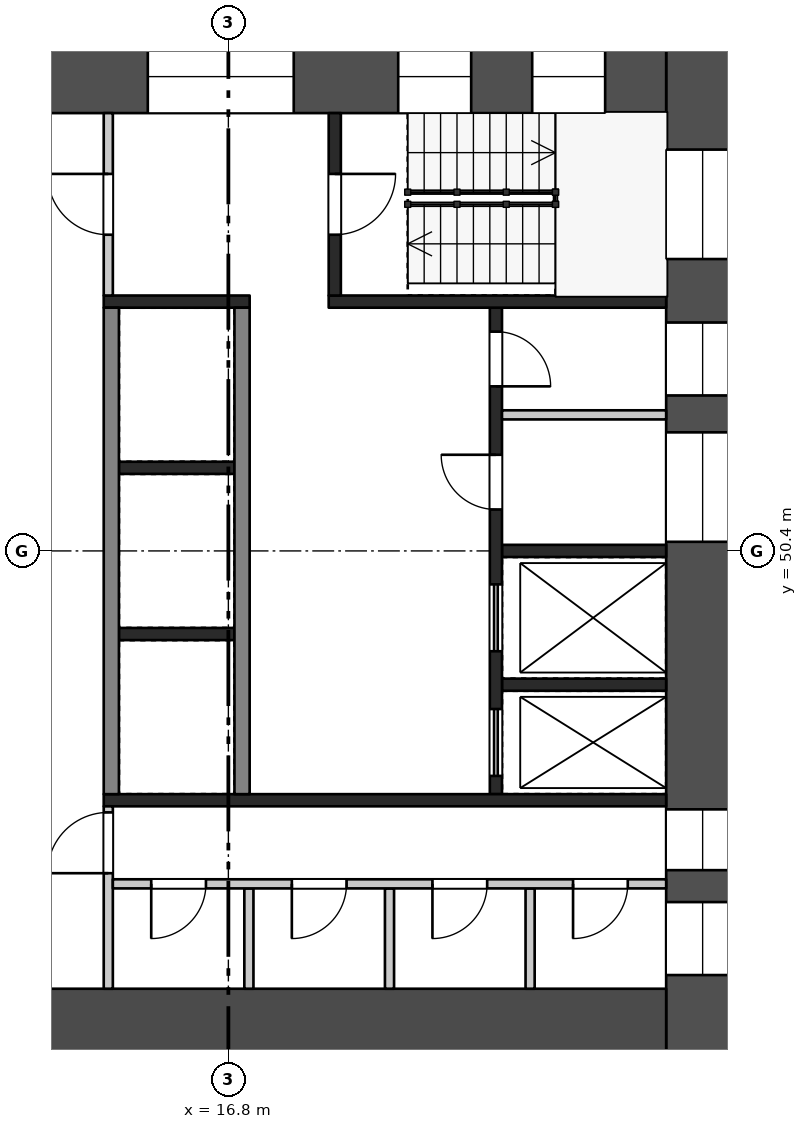
"""IFC4 building model, lengths in metres.
Left out: names, types, materials, properties, quantities, classifications, styles, units other than length and angle.
Written with IfcOpenShell. Run it as: python <this file> out.ifc"""

import sys

from ifc_helpers import new_model, si_unit, direction, frame, frame_2d, origin, place, context, subcontext, project, spatial, rectangle, extrude, element, fill, save


model = new_model("IFC4")
c1 = context("Model", 3, precision=1e-05, world=origin(), true_north=direction((0.0, 1.0)))
c2 = subcontext(c1, "Body", "Model", "MODEL_VIEW")
j1 = project(units=[si_unit("LENGTHUNIT", "METRE"), si_unit("PLANEANGLEUNIT", "RADIAN")], contexts=[c1])
p1 = place(None, origin())
s1 = spatial("IfcSite", under=j1, at=p1, CompositionType="ELEMENT")
p2 = place(p1, origin())
s2 = spatial("IfcBuilding", under=s1, at=p2, CompositionType="ELEMENT")
p3 = place(p2, frame((0.0, 0.0, 91.7)))
s3 = spatial("IfcBuildingStorey", under=s2, at=p3, CompositionType="ELEMENT", Elevation=91.7)
p4 = place(p3, frame((24.6, 58.8, 0.0), z_axis=(0.0, 0.0, 1.0), x_axis=(0.0, -1.0, 0.0)))
e1 = element("IfcWall", 1, at=p4, inside=s3, PredefinedType="SHEAR", context=c2, shape_type="SweptSolid", body=[
    extrude(rectangle(XDim=16.8, YDim=1.2, at=frame_2d((8.4, 0.0))), origin(), (0.0, 0.0, 1.0), 3.22),
])
p5 = place(p4, frame((1.8, 0.0, 0.5)))
e2 = element("IfcOpeningElement", 2, at=p5, cuts=e1, PredefinedType="OPENING", context=c2, shape_type="SweptSolid", body=[
    extrude(rectangle(XDim=1.8, YDim=2.4, at=frame_2d((0.9, 1.2))), frame((0.0, 0.61, 0.0), z_axis=(0.0, -1.0, 0.0), x_axis=(1.0, 0.0, 0.0)), (0.0, 0.0, 1.0), 1.22),
])
p6 = place(p4, frame((4.644, 0.0, 1.6)))
e3 = element("IfcOpeningElement", 3, at=p6, cuts=e1, PredefinedType="OPENING", context=c2, shape_type="SweptSolid", body=[
    extrude(rectangle(XDim=1.2, YDim=1.2, at=frame_2d((0.6, 0.6))), frame((0.0, 0.61, 0.0), z_axis=(0.0, -1.0, 0.0), x_axis=(1.0, 0.0, 0.0)), (0.0, 0.0, 1.0), 1.22),
])
p7 = place(p4, frame((6.45, 0.0, 1.6)))
e4 = element("IfcOpeningElement", 4, at=p7, cuts=e1, PredefinedType="OPENING", context=c2, shape_type="SweptSolid", body=[
    extrude(rectangle(XDim=1.8, YDim=1.2, at=frame_2d((0.9, 0.6))), frame((0.0, 0.61, 0.0), z_axis=(0.0, -1.0, 0.0), x_axis=(1.0, 0.0, 0.0)), (0.0, 0.0, 1.0), 1.22),
])
p8 = place(p4, frame((12.65, 0.0, 0.6)))
e5 = element("IfcOpeningElement", 5, at=p8, cuts=e1, PredefinedType="OPENING", context=c2, shape_type="SweptSolid", body=[
    extrude(rectangle(XDim=1.0, YDim=2.1, at=frame_2d((0.5, 1.05))), frame((0.0, 0.61, 0.0), z_axis=(0.0, -1.0, 0.0), x_axis=(1.0, 0.0, 0.0)), (0.0, 0.0, 1.0), 1.22),
])
p9 = place(p4, frame((14.175, 0.0, 1.6)))
e6 = element("IfcOpeningElement", 6, at=p9, cuts=e1, PredefinedType="OPENING", context=c2, shape_type="SweptSolid", body=[
    extrude(rectangle(XDim=1.2, YDim=1.2, at=frame_2d((0.6, 0.6))), frame((0.0, 0.61, 0.0), z_axis=(0.0, -1.0, 0.0), x_axis=(1.0, 0.0, 0.0)), (0.0, 0.0, 1.0), 1.22),
])
p10 = place(p3, frame((9.6, 58.2, 0.0), z_axis=(0.0, 0.0, 1.0), x_axis=(1.0, 0.0, 0.0)))
e7 = element("IfcWall", 7, at=p10, inside=s3, PredefinedType="SHEAR", context=c2, shape_type="SweptSolid", body=[
    extrude(rectangle(XDim=14.4, YDim=1.2, at=frame_2d((7.2, 0.0))), origin(), (0.0, 0.0, 1.0), 3.22),
])
p11 = place(p10, frame((1.105, 0.0, 0.6)))
e8 = element("IfcOpeningElement", 8, at=p11, cuts=e7, PredefinedType="OPENING", context=c2, shape_type="SweptSolid", body=[
    extrude(rectangle(XDim=3.0, YDim=2.1, at=frame_2d((1.5, 1.05))), frame((0.0, 0.61, 0.0), z_axis=(0.0, -1.0, 0.0), x_axis=(1.0, 0.0, 0.0)), (0.0, 0.0, 1.0), 1.22),
])
p12 = place(p10, frame((5.875, 0.0, 0.6)))
e9 = element("IfcOpeningElement", 9, at=p12, cuts=e7, PredefinedType="OPENING", context=c2, shape_type="SweptSolid", body=[
    extrude(rectangle(XDim=2.4, YDim=2.1, at=frame_2d((1.2, 1.05))), frame((0.0, 0.61, 0.0), z_axis=(0.0, -1.0, 0.0), x_axis=(1.0, 0.0, 0.0)), (0.0, 0.0, 1.0), 1.22),
])
p13 = place(p10, frame((9.993, 0.0, 0.5)))
e10 = element("IfcOpeningElement", 10, at=p13, cuts=e7, PredefinedType="OPENING", context=c2, shape_type="SweptSolid", body=[
    extrude(rectangle(XDim=1.2, YDim=2.4, at=frame_2d((0.6, 1.2))), frame((0.0, 0.61, 0.0), z_axis=(0.0, -1.0, 0.0), x_axis=(1.0, 0.0, 0.0)), (0.0, 0.0, 1.0), 1.22),
])
p14 = place(p10, frame((12.197, 0.0, 0.5)))
e11 = element("IfcOpeningElement", 11, at=p14, cuts=e7, PredefinedType="OPENING", context=c2, shape_type="SweptSolid", body=[
    extrude(rectangle(XDim=1.2, YDim=2.4, at=frame_2d((0.6, 1.2))), frame((0.0, 0.61, 0.0), z_axis=(0.0, -1.0, 0.0), x_axis=(1.0, 0.0, 0.0)), (0.0, 0.0, 1.0), 1.22),
])
p15 = place(p3, frame((9.6, 42.6, 0.0), z_axis=(0.0, 0.0, 1.0), x_axis=(1.0, 0.0, 0.0)))
e12 = element("IfcWall", 12, at=p15, inside=s3, PredefinedType="SHEAR", context=c2, shape_type="SweptSolid", body=[
    extrude(rectangle(XDim=14.4, YDim=1.2, at=frame_2d((7.2, 0.0))), origin(), (0.0, 0.0, 1.0), 3.22),
])
p16 = place(p15, frame((2.1, 0.0, 0.0)))
e13 = element("IfcOpeningElement", 13, at=p16, cuts=e12, PredefinedType="OPENING", context=c2, shape_type="SweptSolid", body=[
    extrude(rectangle(XDim=1.8, YDim=2.1, at=frame_2d((0.9, 1.05))), frame((0.0, 0.61, 0.0), z_axis=(0.0, -1.0, 0.0), x_axis=(1.0, 0.0, 0.0)), (0.0, 0.0, 1.0), 1.22),
])
for number, where, z_axis, x_axis in (
    (14, (15.0, 51.767, 0.0), (0.0, 0.0, 1.0), (1.0, 0.0, 0.0)),
    (15, (15.0, 49.033, 0.0), (0.0, 0.0, 1.0), (1.0, 0.0, 0.0)),
):
    element("IfcWall", number, at=place(p3, frame(where, z_axis=z_axis, x_axis=x_axis)), inside=s3, PredefinedType="SHEAR", context=c2, shape_type="SweptSolid", body=[
        extrude(rectangle(XDim=1.9, YDim=0.2, at=frame_2d((0.95, 0.0))), origin(), (0.0, 0.0, 1.0), 3.22),
    ])
for number, where, z_axis, x_axis in (
    (16, (14.875, 54.4, 0.0), (0.0, 0.0, 1.0), (0.0, -1.0, 0.0)),
    (17, (17.025, 54.4, 0.0), (0.0, 0.0, 1.0), (0.0, -1.0, 0.0)),
):
    element("IfcWall", number, at=place(p3, frame(where, z_axis=z_axis, x_axis=x_axis)), inside=s3, PredefinedType="SHEAR", context=c2, shape_type="SweptSolid", body=[
        extrude(rectangle(XDim=8.0, YDim=0.25, at=frame_2d((4.0, 0.0))), origin(), (0.0, 0.0, 1.0), 3.22),
    ])
for number, where, z_axis, x_axis in (
    (18, (21.3, 50.4, 0.0), (0.0, 0.0, 1.0), (1.0, 0.0, 0.0)),
    (19, (21.3, 48.2, 0.0), (0.0, 0.0, 1.0), (1.0, 0.0, 0.0)),
):
    element("IfcWall", number, at=place(p3, frame(where, z_axis=z_axis, x_axis=x_axis)), inside=s3, PredefinedType="SHEAR", context=c2, shape_type="SweptSolid", body=[
        extrude(rectangle(XDim=2.7, YDim=0.2, at=frame_2d((1.35, 0.0))), origin(), (0.0, 0.0, 1.0), 3.22),
    ])
p17 = place(p3, frame((21.3, 52.637, 0.0), z_axis=(0.0, 0.0, 1.0), x_axis=(1.0, 0.0, 0.0)))
e20 = element("IfcWall", 20, at=p17, inside=s3, PredefinedType="PARTITIONING", context=c2, shape_type="SweptSolid", body=[
    extrude(rectangle(XDim=2.7, YDim=0.15, at=frame_2d((1.35, 0.0))), origin(), (0.0, 0.0, 1.0), 3.22),
])
p18 = place(p3, frame((21.2, 54.4, 0.0), z_axis=(0.0, 0.0, 1.0), x_axis=(0.0, -1.0, 0.0)))
e21 = element("IfcWall", 21, at=p18, inside=s3, PredefinedType="SHEAR", context=c2, shape_type="SweptSolid", body=[
    extrude(rectangle(XDim=8.0, YDim=0.2, at=frame_2d((4.0, 0.0))), origin(), (0.0, 0.0, 1.0), 3.22),
])
p19 = place(p18, frame((0.394, 0.0, 0.0)))
e22 = element("IfcOpeningElement", 22, at=p19, cuts=e21, PredefinedType="OPENING", context=c2, shape_type="SweptSolid", body=[
    extrude(rectangle(XDim=0.9, YDim=2.1, at=frame_2d((0.45, 1.05))), frame((0.0, 0.11, 0.0), z_axis=(0.0, -1.0, 0.0), x_axis=(1.0, 0.0, 0.0)), (0.0, 0.0, 1.0), 0.22),
])
p20 = place(p18, frame((2.419, 0.0, 0.0)))
e23 = element("IfcOpeningElement", 23, at=p20, cuts=e21, PredefinedType="OPENING", context=c2, shape_type="SweptSolid", body=[
    extrude(rectangle(XDim=0.9, YDim=2.1, at=frame_2d((0.45, 1.05))), frame((0.0, 0.11, 0.0), z_axis=(0.0, -1.0, 0.0), x_axis=(1.0, 0.0, 0.0)), (0.0, 0.0, 1.0), 0.22),
])
p21 = place(p18, frame((4.55, 0.0, 0.0)))
e24 = element("IfcOpeningElement", 24, at=p21, cuts=e21, PredefinedType="OPENING", context=c2, shape_type="SweptSolid", body=[
    extrude(rectangle(XDim=1.1, YDim=2.1, at=frame_2d((0.55, 1.05))), frame((0.0, 0.11, 0.0), z_axis=(0.0, -1.0, 0.0), x_axis=(1.0, 0.0, 0.0)), (0.0, 0.0, 1.0), 0.22),
])
p22 = place(p18, frame((6.6, 0.0, 0.0)))
e25 = element("IfcOpeningElement", 25, at=p22, cuts=e21, PredefinedType="OPENING", context=c2, shape_type="SweptSolid", body=[
    extrude(rectangle(XDim=1.1, YDim=2.1, at=frame_2d((0.55, 1.05))), frame((0.0, 0.11, 0.0), z_axis=(0.0, -1.0, 0.0), x_axis=(1.0, 0.0, 0.0)), (0.0, 0.0, 1.0), 0.22),
])
p23 = place(p3, frame((14.75, 54.5, 0.0), z_axis=(0.0, 0.0, 1.0), x_axis=(1.0, 0.0, 0.0)))
e26 = element("IfcWall", 26, at=p23, inside=s3, PredefinedType="SHEAR", context=c2, shape_type="SweptSolid", body=[
    extrude(rectangle(XDim=2.4, YDim=0.2, at=frame_2d((1.2, 0.0))), origin(), (0.0, 0.0, 1.0), 3.22),
])
p24 = place(p3, frame((18.45, 54.5, 0.0), z_axis=(0.0, 0.0, 1.0), x_axis=(1.0, 0.0, 0.0)))
e27 = element("IfcWall", 27, at=p24, inside=s3, PredefinedType="SHEAR", context=c2, shape_type="SweptSolid", body=[
    extrude(rectangle(XDim=5.55, YDim=0.2, at=frame_2d((2.775, 0.0))), origin(), (0.0, 0.0, 1.0), 3.22),
])
p25 = place(p3, frame((14.825, 57.6, 0.0), z_axis=(0.0, 0.0, 1.0), x_axis=(0.0, -1.0, 0.0)))
e28 = element("IfcWall", 28, at=p25, inside=s3, PredefinedType="PARTITIONING", context=c2, shape_type="SweptSolid", body=[
    extrude(rectangle(XDim=3.0, YDim=0.15, at=frame_2d((1.5, 0.0))), origin(), (0.0, 0.0, 1.0), 3.22),
])
p26 = place(p25, frame((1.0, 0.0, 0.0)))
e29 = element("IfcOpeningElement", 29, at=p26, cuts=e28, PredefinedType="OPENING", context=c2, shape_type="SweptSolid", body=[
    extrude(rectangle(XDim=1.0, YDim=2.1, at=frame_2d((0.5, 1.05))), frame((0.0, 0.085, 0.0), z_axis=(0.0, -1.0, 0.0), x_axis=(1.0, 0.0, 0.0)), (0.0, 0.0, 1.0), 0.17),
])
p27 = place(p3, frame((18.55, 57.6, 0.0), z_axis=(0.0, 0.0, 1.0), x_axis=(0.0, -1.0, 0.0)))
e30 = element("IfcWall", 30, at=p27, inside=s3, PredefinedType="SHEAR", context=c2, shape_type="SweptSolid", body=[
    extrude(rectangle(XDim=3.0, YDim=0.2, at=frame_2d((1.5, 0.0))), origin(), (0.0, 0.0, 1.0), 3.22),
])
p28 = place(p27, frame((1.0, 0.0, 0.0)))
e31 = element("IfcOpeningElement", 31, at=p28, cuts=e30, PredefinedType="OPENING", context=c2, shape_type="SweptSolid", body=[
    extrude(rectangle(XDim=1.0, YDim=2.1, at=frame_2d((0.5, 1.05))), frame((0.0, 0.11, 0.0), z_axis=(0.0, -1.0, 0.0), x_axis=(1.0, 0.0, 0.0)), (0.0, 0.0, 1.0), 0.22),
])
p29 = place(p3, frame((14.75, 46.3, 0.0), z_axis=(0.0, 0.0, 1.0), x_axis=(1.0, 0.0, 0.0)))
e32 = element("IfcWall", 32, at=p29, inside=s3, PredefinedType="SHEAR", context=c2, shape_type="SweptSolid", body=[
    extrude(rectangle(XDim=9.25, YDim=0.2, at=frame_2d((4.625, 0.0))), origin(), (0.0, 0.0, 1.0), 3.22),
])
p30 = place(p3, frame((14.825, 46.2, 0.0), z_axis=(0.0, 0.0, 1.0), x_axis=(0.0, -1.0, 0.0)))
e33 = element("IfcWall", 33, at=p30, inside=s3, PredefinedType="PARTITIONING", context=c2, shape_type="SweptSolid", body=[
    extrude(rectangle(XDim=3.0, YDim=0.15, at=frame_2d((1.5, 0.0))), origin(), (0.0, 0.0, 1.0), 3.22),
])
p31 = place(p30, frame((0.1, 0.0, 0.0)))
e34 = element("IfcOpeningElement", 34, at=p31, cuts=e33, PredefinedType="OPENING", context=c2, shape_type="SweptSolid", body=[
    extrude(rectangle(XDim=1.0, YDim=2.1, at=frame_2d((0.5, 1.05))), frame((0.0, 0.085, 0.0), z_axis=(0.0, -1.0, 0.0), x_axis=(1.0, 0.0, 0.0)), (0.0, 0.0, 1.0), 0.17),
])
for number, where, z_axis, x_axis in (
    (35, (17.137, 44.85, 0.0), (0.0, 0.0, 1.0), (0.0, -1.0, 0.0)),
    (36, (19.45, 44.85, 0.0), (0.0, 0.0, 1.0), (0.0, -1.0, 0.0)),
    (37, (21.762, 44.85, 0.0), (0.0, 0.0, 1.0), (0.0, -1.0, 0.0)),
):
    element("IfcWall", number, at=place(p3, frame(where, z_axis=z_axis, x_axis=x_axis)), inside=s3, PredefinedType="PARTITIONING", context=c2, shape_type="SweptSolid", body=[
        extrude(rectangle(XDim=1.65, YDim=0.15, at=frame_2d((0.825, 0.0))), origin(), (0.0, 0.0, 1.0), 3.22),
    ])
p32 = place(p3, frame((14.9, 44.925, 0.0), z_axis=(0.0, 0.0, 1.0), x_axis=(1.0, 0.0, 0.0)))
e38 = element("IfcWall", 38, at=p32, inside=s3, PredefinedType="PARTITIONING", context=c2, shape_type="SweptSolid", body=[
    extrude(rectangle(XDim=9.1, YDim=0.15, at=frame_2d((4.55, 0.0))), origin(), (0.0, 0.0, 1.0), 3.22),
])
p33 = place(p32, frame((0.631, 0.0, 0.0)))
e39 = element("IfcOpeningElement", 39, at=p33, cuts=e38, PredefinedType="OPENING", context=c2, shape_type="SweptSolid", body=[
    extrude(rectangle(XDim=0.9, YDim=2.1, at=frame_2d((0.45, 1.05))), frame((0.0, 0.085, 0.0), z_axis=(0.0, -1.0, 0.0), x_axis=(1.0, 0.0, 0.0)), (0.0, 0.0, 1.0), 0.17),
])
p34 = place(p32, frame((2.944, 0.0, 0.0)))
e40 = element("IfcOpeningElement", 40, at=p34, cuts=e38, PredefinedType="OPENING", context=c2, shape_type="SweptSolid", body=[
    extrude(rectangle(XDim=0.9, YDim=2.1, at=frame_2d((0.45, 1.05))), frame((0.0, 0.085, 0.0), z_axis=(0.0, -1.0, 0.0), x_axis=(1.0, 0.0, 0.0)), (0.0, 0.0, 1.0), 0.17),
])
p35 = place(p32, frame((5.256, 0.0, 0.0)))
e41 = element("IfcOpeningElement", 41, at=p35, cuts=e38, PredefinedType="OPENING", context=c2, shape_type="SweptSolid", body=[
    extrude(rectangle(XDim=0.9, YDim=2.1, at=frame_2d((0.45, 1.05))), frame((0.0, 0.085, 0.0), z_axis=(0.0, -1.0, 0.0), x_axis=(1.0, 0.0, 0.0)), (0.0, 0.0, 1.0), 0.17),
])
p36 = place(p32, frame((7.569, 0.0, 0.0)))
e42 = element("IfcOpeningElement", 42, at=p36, cuts=e38, PredefinedType="OPENING", context=c2, shape_type="SweptSolid", body=[
    extrude(rectangle(XDim=0.9, YDim=2.1, at=frame_2d((0.45, 1.05))), frame((0.0, 0.085, 0.0), z_axis=(0.0, -1.0, 0.0), x_axis=(1.0, 0.0, 0.0)), (0.0, 0.0, 1.0), 0.17),
])
p37 = place(p19, origin())
e43 = element("IfcDoor", 43, at=p37, inside=s3, OperationType="SINGLE_SWING_RIGHT", PredefinedType="DOOR", context=c2, shape_type="SweptSolid", body=[
    extrude(rectangle(XDim=0.9, YDim=2.1, at=frame_2d((0.45, 1.05))), frame((0.0, 0.025, 0.0), z_axis=(0.0, -1.0, 0.0), x_axis=(1.0, 0.0, 0.0)), (0.0, 0.0, 1.0), 0.05),
])
fill(e22, e43)
p38 = place(p20, frame((0.9, 0.0, 0.0), z_axis=(0.0, 0.0, 1.0), x_axis=(-1.0, 0.0, 0.0)))
e44 = element("IfcDoor", 44, at=p38, inside=s3, OperationType="SINGLE_SWING_RIGHT", PredefinedType="DOOR", context=c2, shape_type="SweptSolid", body=[
    extrude(rectangle(XDim=0.9, YDim=2.1, at=frame_2d((0.45, 1.05))), frame((0.0, 0.025, 0.0), z_axis=(0.0, -1.0, 0.0), x_axis=(1.0, 0.0, 0.0)), (0.0, 0.0, 1.0), 0.05),
])
fill(e23, e44)
p39 = place(p21, origin())
e45 = element("IfcDoor", 45, at=p39, inside=s3, OperationType="DOUBLE_DOOR_SLIDING", PredefinedType="DOOR", context=c2, shape_type="SweptSolid", body=[
    extrude(rectangle(XDim=1.1, YDim=2.1, at=frame_2d((0.55, 1.05))), frame((0.0, 0.025, 0.0), z_axis=(0.0, -1.0, 0.0), x_axis=(1.0, 0.0, 0.0)), (0.0, 0.0, 1.0), 0.05),
])
fill(e24, e45)
p40 = place(p22, origin())
e46 = element("IfcDoor", 46, at=p40, inside=s3, OperationType="DOUBLE_DOOR_SLIDING", PredefinedType="DOOR", context=c2, shape_type="SweptSolid", body=[
    extrude(rectangle(XDim=1.1, YDim=2.1, at=frame_2d((0.55, 1.05))), frame((0.0, 0.025, 0.0), z_axis=(0.0, -1.0, 0.0), x_axis=(1.0, 0.0, 0.0)), (0.0, 0.0, 1.0), 0.05),
])
fill(e25, e46)
p41 = place(p26, frame((1.0, 0.0, 0.0), z_axis=(0.0, 0.0, 1.0), x_axis=(-1.0, 0.0, 0.0)))
e47 = element("IfcDoor", 47, at=p41, inside=s3, OperationType="SINGLE_SWING_RIGHT", PredefinedType="DOOR", context=c2, shape_type="SweptSolid", body=[
    extrude(rectangle(XDim=1.0, YDim=2.1, at=frame_2d((0.5, 1.05))), frame((0.0, 0.025, 0.0), z_axis=(0.0, -1.0, 0.0), x_axis=(1.0, 0.0, 0.0)), (0.0, 0.0, 1.0), 0.05),
])
fill(e29, e47)
p42 = place(p28, origin())
e48 = element("IfcDoor", 48, at=p42, inside=s3, OperationType="SINGLE_SWING_LEFT", PredefinedType="DOOR", context=c2, shape_type="SweptSolid", body=[
    extrude(rectangle(XDim=1.0, YDim=2.1, at=frame_2d((0.5, 1.05))), frame((0.0, 0.025, 0.0), z_axis=(0.0, -1.0, 0.0), x_axis=(1.0, 0.0, 0.0)), (0.0, 0.0, 1.0), 0.05),
])
fill(e31, e48)
p43 = place(p31, frame((1.0, 0.0, 0.0), z_axis=(0.0, 0.0, 1.0), x_axis=(-1.0, 0.0, 0.0)))
e49 = element("IfcDoor", 49, at=p43, inside=s3, OperationType="SINGLE_SWING_LEFT", PredefinedType="DOOR", context=c2, shape_type="SweptSolid", body=[
    extrude(rectangle(XDim=1.0, YDim=2.1, at=frame_2d((0.5, 1.05))), frame((0.0, 0.025, 0.0), z_axis=(0.0, -1.0, 0.0), x_axis=(1.0, 0.0, 0.0)), (0.0, 0.0, 1.0), 0.05),
])
fill(e34, e49)
p44 = place(p33, frame((0.9, 0.0, 0.0), z_axis=(0.0, 0.0, 1.0), x_axis=(-1.0, 0.0, 0.0)))
e50 = element("IfcDoor", 50, at=p44, inside=s3, OperationType="SINGLE_SWING_RIGHT", PredefinedType="DOOR", context=c2, shape_type="SweptSolid", body=[
    extrude(rectangle(XDim=0.9, YDim=2.1, at=frame_2d((0.45, 1.05))), frame((0.0, 0.025, 0.0), z_axis=(0.0, -1.0, 0.0), x_axis=(1.0, 0.0, 0.0)), (0.0, 0.0, 1.0), 0.05),
])
fill(e39, e50)
p45 = place(p34, frame((0.9, 0.0, 0.0), z_axis=(0.0, 0.0, 1.0), x_axis=(-1.0, 0.0, 0.0)))
e51 = element("IfcDoor", 51, at=p45, inside=s3, OperationType="SINGLE_SWING_RIGHT", PredefinedType="DOOR", context=c2, shape_type="SweptSolid", body=[
    extrude(rectangle(XDim=0.9, YDim=2.1, at=frame_2d((0.45, 1.05))), frame((0.0, 0.025, 0.0), z_axis=(0.0, -1.0, 0.0), x_axis=(1.0, 0.0, 0.0)), (0.0, 0.0, 1.0), 0.05),
])
fill(e40, e51)
p46 = place(p35, frame((0.9, 0.0, 0.0), z_axis=(0.0, 0.0, 1.0), x_axis=(-1.0, 0.0, 0.0)))
e52 = element("IfcDoor", 52, at=p46, inside=s3, OperationType="SINGLE_SWING_RIGHT", PredefinedType="DOOR", context=c2, shape_type="SweptSolid", body=[
    extrude(rectangle(XDim=0.9, YDim=2.1, at=frame_2d((0.45, 1.05))), frame((0.0, 0.025, 0.0), z_axis=(0.0, -1.0, 0.0), x_axis=(1.0, 0.0, 0.0)), (0.0, 0.0, 1.0), 0.05),
])
fill(e41, e52)
p47 = place(p36, frame((0.9, 0.0, 0.0), z_axis=(0.0, 0.0, 1.0), x_axis=(-1.0, 0.0, 0.0)))
e53 = element("IfcDoor", 53, at=p47, inside=s3, OperationType="SINGLE_SWING_RIGHT", PredefinedType="DOOR", context=c2, shape_type="SweptSolid", body=[
    extrude(rectangle(XDim=0.9, YDim=2.1, at=frame_2d((0.45, 1.05))), frame((0.0, 0.025, 0.0), z_axis=(0.0, -1.0, 0.0), x_axis=(1.0, 0.0, 0.0)), (0.0, 0.0, 1.0), 0.05),
])
fill(e42, e53)
p48 = place(p5, origin())
e54 = element("IfcWindow", 54, at=p48, inside=s3, PartitioningType="SINGLE_PANEL", PredefinedType="WINDOW", context=c2, shape_type="SweptSolid", body=[
    extrude(rectangle(XDim=1.8, YDim=2.4, at=frame_2d((0.9, 1.2))), frame((0.0, 0.03, 0.0), z_axis=(0.0, -1.0, 0.0), x_axis=(1.0, 0.0, 0.0)), (0.0, 0.0, 1.0), 0.06),
])
fill(e2, e54)
p49 = place(p6, origin())
e55 = element("IfcWindow", 55, at=p49, inside=s3, PartitioningType="SINGLE_PANEL", PredefinedType="WINDOW", context=c2, shape_type="SweptSolid", body=[
    extrude(rectangle(XDim=1.2, YDim=1.2, at=frame_2d((0.6, 0.6))), frame((0.0, 0.03, 0.0), z_axis=(0.0, -1.0, 0.0), x_axis=(1.0, 0.0, 0.0)), (0.0, 0.0, 1.0), 0.06),
])
fill(e3, e55)
p50 = place(p7, origin())
e56 = element("IfcWindow", 56, at=p50, inside=s3, PartitioningType="SINGLE_PANEL", PredefinedType="WINDOW", context=c2, shape_type="SweptSolid", body=[
    extrude(rectangle(XDim=1.8, YDim=1.2, at=frame_2d((0.9, 0.6))), frame((0.0, 0.03, 0.0), z_axis=(0.0, -1.0, 0.0), x_axis=(1.0, 0.0, 0.0)), (0.0, 0.0, 1.0), 0.06),
])
fill(e4, e56)
p51 = place(p8, origin())
e57 = element("IfcWindow", 57, at=p51, inside=s3, PartitioningType="SINGLE_PANEL", PredefinedType="WINDOW", context=c2, shape_type="SweptSolid", body=[
    extrude(rectangle(XDim=1.0, YDim=2.1, at=frame_2d((0.5, 1.05))), frame((0.0, 0.03, 0.0), z_axis=(0.0, -1.0, 0.0), x_axis=(1.0, 0.0, 0.0)), (0.0, 0.0, 1.0), 0.06),
])
fill(e5, e57)
p52 = place(p9, origin())
e58 = element("IfcWindow", 58, at=p52, inside=s3, PartitioningType="SINGLE_PANEL", PredefinedType="WINDOW", context=c2, shape_type="SweptSolid", body=[
    extrude(rectangle(XDim=1.2, YDim=1.2, at=frame_2d((0.6, 0.6))), frame((0.0, 0.03, 0.0), z_axis=(0.0, -1.0, 0.0), x_axis=(1.0, 0.0, 0.0)), (0.0, 0.0, 1.0), 0.06),
])
fill(e6, e58)
p53 = place(p12, origin())
e59 = element("IfcWindow", 59, at=p53, inside=s3, PartitioningType="SINGLE_PANEL", PredefinedType="WINDOW", context=c2, shape_type="SweptSolid", body=[
    extrude(rectangle(XDim=2.4, YDim=2.1, at=frame_2d((1.2, 1.05))), frame((0.0, 0.03, 0.0), z_axis=(0.0, -1.0, 0.0), x_axis=(1.0, 0.0, 0.0)), (0.0, 0.0, 1.0), 0.06),
])
fill(e9, e59)
p54 = place(p13, origin())
e60 = element("IfcWindow", 60, at=p54, inside=s3, PartitioningType="SINGLE_PANEL", PredefinedType="WINDOW", context=c2, shape_type="SweptSolid", body=[
    extrude(rectangle(XDim=1.2, YDim=2.4, at=frame_2d((0.6, 1.2))), frame((0.0, 0.03, 0.0), z_axis=(0.0, -1.0, 0.0), x_axis=(1.0, 0.0, 0.0)), (0.0, 0.0, 1.0), 0.06),
])
fill(e10, e60)
p55 = place(p14, origin())
e61 = element("IfcWindow", 61, at=p55, inside=s3, PartitioningType="SINGLE_PANEL", PredefinedType="WINDOW", context=c2, shape_type="SweptSolid", body=[
    extrude(rectangle(XDim=1.2, YDim=2.4, at=frame_2d((0.6, 1.2))), frame((0.0, 0.03, 0.0), z_axis=(0.0, -1.0, 0.0), x_axis=(1.0, 0.0, 0.0)), (0.0, 0.0, 1.0), 0.06),
])
fill(e11, e61)
save(model, sys.argv[1])
